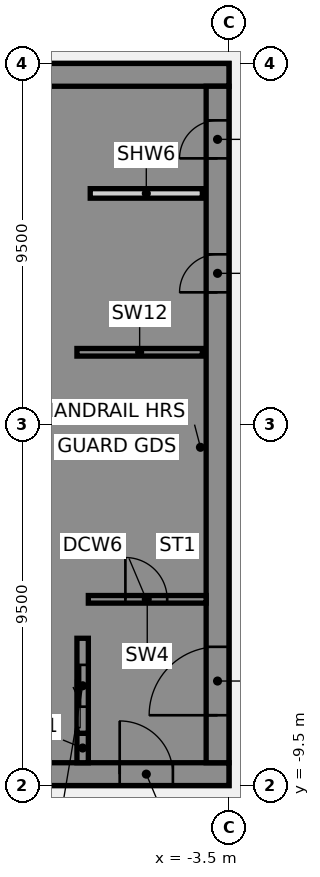
"""IFC4 building model, lengths in metres.
Left out: names, types, materials, properties, quantities, classifications, styles, units other than length and angle.
Written with IfcOpenShell. Run it as: python <this file> out.ifc"""

import sys

from ifc_helpers import new_model, si_unit, direction, frame, frame_2d, origin, place, context, subcontext, project, spatial, polyline, rectangle, outline, extrude, element, fill, save


model = new_model("IFC4")
c1 = context("Model", 3, precision=1e-05, world=origin(), true_north=direction((0.0, 1.0)))
c2 = subcontext(c1, "Body", "Model", "MODEL_VIEW")
j1 = project(units=[si_unit("LENGTHUNIT", "METRE"), si_unit("PLANEANGLEUNIT", "RADIAN")], contexts=[c1])
p1 = place(None, origin())
s1 = spatial("IfcSite", under=j1, at=p1, CompositionType="ELEMENT")
p2 = place(p1, origin())
s2 = spatial("IfcBuilding", under=s1, at=p2, CompositionType="ELEMENT")
p3 = place(p2, frame((0.0, 0.0, 163.0)))
s3 = spatial("IfcBuildingStorey", under=s2, at=p3, CompositionType="ELEMENT", Elevation=163.0)
p4 = place(p3, frame((-16.5, -9.2, 0.0), z_axis=(0.0, 0.0, 1.0), x_axis=(1.0, 0.0, 0.0)))
e1 = element("IfcWall", 1, at=p4, inside=s3, PredefinedType="SHEAR", context=c2, shape_type="SweptSolid", body=[
    extrude(rectangle(XDim=13.0, YDim=0.6, at=frame_2d((6.5, 0.0))), origin(), (0.0, 0.0, 1.0), 3.61),
])
p5 = place(p4, frame((4.15, 0.0, 0.0)))
e2 = element("IfcOpeningElement", 2, at=p5, cuts=e1, PredefinedType="OPENING", context=c2, shape_type="SweptSolid", body=[
    extrude(rectangle(XDim=1.4, YDim=2.1, at=frame_2d((0.7, 1.05))), frame((0.0, 0.31, 0.0), z_axis=(0.0, -1.0, 0.0), x_axis=(1.0, 0.0, 0.0)), (0.0, 0.0, 1.0), 0.62),
])
p6 = place(p4, frame((10.125, 0.0, 0.0)))
e3 = element("IfcOpeningElement", 3, at=p6, cuts=e1, PredefinedType="OPENING", context=c2, shape_type="SweptSolid", body=[
    extrude(rectangle(XDim=1.4, YDim=2.1, at=frame_2d((0.7, 1.05))), frame((0.0, 0.31, 0.0), z_axis=(0.0, -1.0, 0.0), x_axis=(1.0, 0.0, 0.0)), (0.0, 0.0, 1.0), 0.62),
])
p7 = place(p3, frame((-16.5, 9.2, 0.0), z_axis=(0.0, 0.0, 1.0), x_axis=(1.0, 0.0, 0.0)))
e4 = element("IfcWall", 4, at=p7, inside=s3, PredefinedType="SHEAR", context=c2, shape_type="SweptSolid", body=[
    extrude(rectangle(XDim=13.0, YDim=0.6, at=frame_2d((6.5, 0.0))), origin(), (0.0, 0.0, 1.0), 3.61),
])
p8 = place(p3, origin())
e5 = element("IfcWall", 5, at=p8, inside=s3, PredefinedType="SHEAR", context=c2, shape_type="SweptSolid", body=[
    extrude(outline(polyline([(-9.8, -5.375), (-9.8, -5.625), (-7.5, -5.625), (-7.2, -5.625), (-7.2, 8.9), (-7.5, 8.9), (-9.8, 8.9), (-9.8, 8.125), (-7.5, 8.125), (-7.5, 5.625), (-9.8, 5.625), (-9.8, 5.375), (-7.5, 5.375), (-7.5, 2.875), (-9.8, 2.875), (-9.8, 2.625), (-7.5, 2.625), (-7.5, 0.125), (-9.8, 0.125), (-9.8, -0.125), (-7.5, -0.125), (-7.5, -2.625), (-9.8, -2.625), (-9.8, -2.875), (-7.5, -2.875), (-7.5, -5.375), (-9.8, -5.375)])), origin(), (0.0, 0.0, 1.0), 3.61),
])
p9 = place(p3, origin())
e6 = element("IfcWall", 6, at=p9, inside=s3, PredefinedType="SHEAR", context=c2, shape_type="SweptSolid", body=[
    extrude(outline(polyline([(-7.5, -8.125), (-9.55, -8.125), (-9.55, -5.625), (-9.8, -5.625), (-9.8, -8.125), (-9.8, -8.9), (-7.5, -8.9), (-7.5, -8.125)])), origin(), (0.0, 0.0, 1.0), 3.61),
])
p10 = place(p3, frame((-7.35, -8.9, 0.0), z_axis=(0.0, 0.0, 1.0), x_axis=(0.0, 1.0, 0.0)))
e7 = element("IfcWall", 7, at=p10, inside=s3, PredefinedType="SHEAR", context=c2, shape_type="SweptSolid", body=[
    extrude(rectangle(XDim=0.775, YDim=0.3, at=frame_2d((0.387, 0.0))), origin(), (0.0, 0.0, 1.0), 3.61),
])
p11 = place(p3, frame((-7.5, 1.9, 0.0), z_axis=(0.0, 0.0, 1.0), x_axis=(1.0, 0.0, 0.0)))
e8 = element("IfcWall", 8, at=p11, inside=s3, PredefinedType="SHEAR", context=c2, shape_type="SweptSolid", body=[
    extrude(rectangle(XDim=3.3, YDim=0.2, at=frame_2d((1.65, 0.0))), origin(), (0.0, 0.0, 1.0), 3.61),
])
p12 = place(p3, frame((-7.35, -8.125, 0.0), z_axis=(0.0, 0.0, 1.0), x_axis=(0.0, 1.0, 0.0)))
e9 = element("IfcWall", 9, at=p12, inside=s3, PredefinedType="SHEAR", context=c2, shape_type="SweptSolid", body=[
    extrude(rectangle(XDim=2.5, YDim=0.3, at=frame_2d((1.25, 0.0))), origin(), (0.0, 0.0, 1.0), 3.61),
])
p13 = place(p12, frame((0.7, 0.0, 0.0)))
e10 = element("IfcOpeningElement", 10, at=p13, cuts=e9, PredefinedType="OPENING", context=c2, shape_type="SweptSolid", body=[
    extrude(rectangle(XDim=1.1, YDim=2.1, at=frame_2d((0.55, 1.05))), frame((0.0, 0.16, 0.0), z_axis=(0.0, -1.0, 0.0), x_axis=(1.0, 0.0, 0.0)), (0.0, 0.0, 1.0), 0.32),
])
p14 = place(p3, frame((-3.8, -8.9, 0.0), z_axis=(0.0, 0.0, 1.0), x_axis=(0.0, 1.0, 0.0)))
e11 = element("IfcWall", 11, at=p14, inside=s3, PredefinedType="SHEAR", context=c2, shape_type="SweptSolid", body=[
    extrude(rectangle(XDim=17.8, YDim=0.6, at=frame_2d((8.9, 0.0))), origin(), (0.0, 0.0, 1.0), 3.61),
])
p15 = place(p14, frame((1.25, 0.0, 0.0)))
e12 = element("IfcOpeningElement", 12, at=p15, cuts=e11, PredefinedType="OPENING", context=c2, shape_type="SweptSolid", body=[
    extrude(rectangle(XDim=1.8, YDim=2.1, at=frame_2d((0.9, 1.05))), frame((0.0, 0.31, 0.0), z_axis=(0.0, -1.0, 0.0), x_axis=(1.0, 0.0, 0.0)), (0.0, 0.0, 1.0), 0.62),
])
p16 = place(p14, frame((12.377, 0.0, 0.0)))
e13 = element("IfcOpeningElement", 13, at=p16, cuts=e11, PredefinedType="OPENING", context=c2, shape_type="SweptSolid", body=[
    extrude(rectangle(XDim=1.0, YDim=2.1, at=frame_2d((0.5, 1.05))), frame((0.0, 0.31, 0.0), z_axis=(0.0, -1.0, 0.0), x_axis=(1.0, 0.0, 0.0)), (0.0, 0.0, 1.0), 0.62),
])
p17 = place(p14, frame((15.903, 0.0, 0.0)))
e14 = element("IfcOpeningElement", 14, at=p17, cuts=e11, PredefinedType="OPENING", context=c2, shape_type="SweptSolid", body=[
    extrude(rectangle(XDim=1.0, YDim=2.1, at=frame_2d((0.5, 1.05))), frame((0.0, 0.31, 0.0), z_axis=(0.0, -1.0, 0.0), x_axis=(1.0, 0.0, 0.0)), (0.0, 0.0, 1.0), 0.62),
])
p18 = place(p3, frame((-7.15, 6.08, 0.0), z_axis=(0.0, 0.0, 1.0), x_axis=(1.0, 0.0, 0.0)))
e15 = element("IfcWall", 15, at=p18, inside=s3, PredefinedType="PARTITIONING", context=c2, shape_type="SweptSolid", body=[
    extrude(rectangle(XDim=2.95, YDim=0.25, at=frame_2d((1.475, 0.0))), origin(), (0.0, 0.0, 1.0), 3.61),
])
p19 = place(p3, frame((-7.2, -4.6, 0.0), z_axis=(0.0, 0.0, 1.0), x_axis=(1.0, 0.0, 0.0)))
e16 = element("IfcWall", 16, at=p19, inside=s3, PredefinedType="SHEAR", context=c2, shape_type="SweptSolid", body=[
    extrude(rectangle(XDim=3.1, YDim=0.2, at=frame_2d((1.55, 0.0))), origin(), (0.0, 0.0, 1.0), 3.61),
])
p20 = place(p19, frame((0.975, 0.0, 0.0)))
e17 = element("IfcOpeningElement", 17, at=p20, cuts=e16, PredefinedType="OPENING", context=c2, shape_type="SweptSolid", body=[
    extrude(rectangle(XDim=1.1, YDim=2.1, at=frame_2d((0.55, 1.05))), frame((0.0, 0.11, 0.0), z_axis=(0.0, -1.0, 0.0), x_axis=(1.0, 0.0, 0.0)), (0.0, 0.0, 1.0), 0.22),
])
p21 = place(p6, origin())
e18 = element("IfcDoor", 18, at=p21, inside=s3, OperationType="SINGLE_SWING_LEFT", PredefinedType="DOOR", context=c2, shape_type="SweptSolid", body=[
    extrude(rectangle(XDim=1.4, YDim=2.1, at=frame_2d((0.7, 1.05))), frame((0.0, 0.025, 0.0), z_axis=(0.0, -1.0, 0.0), x_axis=(1.0, 0.0, 0.0)), (0.0, 0.0, 1.0), 0.05),
])
fill(e3, e18)
p22 = place(p15, origin())
e19 = element("IfcDoor", 19, at=p22, inside=s3, OperationType="SINGLE_SWING_LEFT", PredefinedType="DOOR", context=c2, shape_type="SweptSolid", body=[
    extrude(rectangle(XDim=1.8, YDim=2.1, at=frame_2d((0.9, 1.05))), frame((0.0, 0.025, 0.0), z_axis=(0.0, -1.0, 0.0), x_axis=(1.0, 0.0, 0.0)), (0.0, 0.0, 1.0), 0.05),
])
fill(e12, e19)
p23 = place(p16, origin())
e20 = element("IfcDoor", 20, at=p23, inside=s3, OperationType="SINGLE_SWING_LEFT", PredefinedType="DOOR", context=c2, shape_type="SweptSolid", body=[
    extrude(rectangle(XDim=1.0, YDim=2.1, at=frame_2d((0.5, 1.05))), frame((0.0, 0.275, 0.0), z_axis=(0.0, -1.0, 0.0), x_axis=(1.0, 0.0, 0.0)), (0.0, 0.0, 1.0), 0.05),
])
fill(e13, e20)
p24 = place(p17, origin())
e21 = element("IfcDoor", 21, at=p24, inside=s3, OperationType="SINGLE_SWING_LEFT", PredefinedType="DOOR", context=c2, shape_type="SweptSolid", body=[
    extrude(rectangle(XDim=1.0, YDim=2.1, at=frame_2d((0.5, 1.05))), frame((0.0, 0.275, 0.0), z_axis=(0.0, -1.0, 0.0), x_axis=(1.0, 0.0, 0.0)), (0.0, 0.0, 1.0), 0.05),
])
fill(e14, e21)
p25 = place(p20, origin())
e22 = element("IfcDoor", 22, at=p25, inside=s3, OperationType="SINGLE_SWING_LEFT", PredefinedType="DOOR", context=c2, shape_type="SweptSolid", body=[
    extrude(rectangle(XDim=1.1, YDim=2.1, at=frame_2d((0.55, 1.05))), frame((0.0, 0.025, 0.0), z_axis=(0.0, -1.0, 0.0), x_axis=(1.0, 0.0, 0.0)), (0.0, 0.0, 1.0), 0.05),
])
fill(e17, e22)
p26 = place(p13, origin())
e23 = element("IfcDoor", 23, at=p26, inside=s3, OperationType="SLIDING_TO_LEFT", PredefinedType="DOOR", context=c2, shape_type="SweptSolid", body=[
    extrude(rectangle(XDim=1.1, YDim=2.1, at=frame_2d((0.55, 1.05))), frame((0.0, 0.025, 0.0), z_axis=(0.0, -1.0, 0.0), x_axis=(1.0, 0.0, 0.0)), (0.0, 0.0, 1.0), 0.05),
])
fill(e10, e23)
save(model, sys.argv[1])
